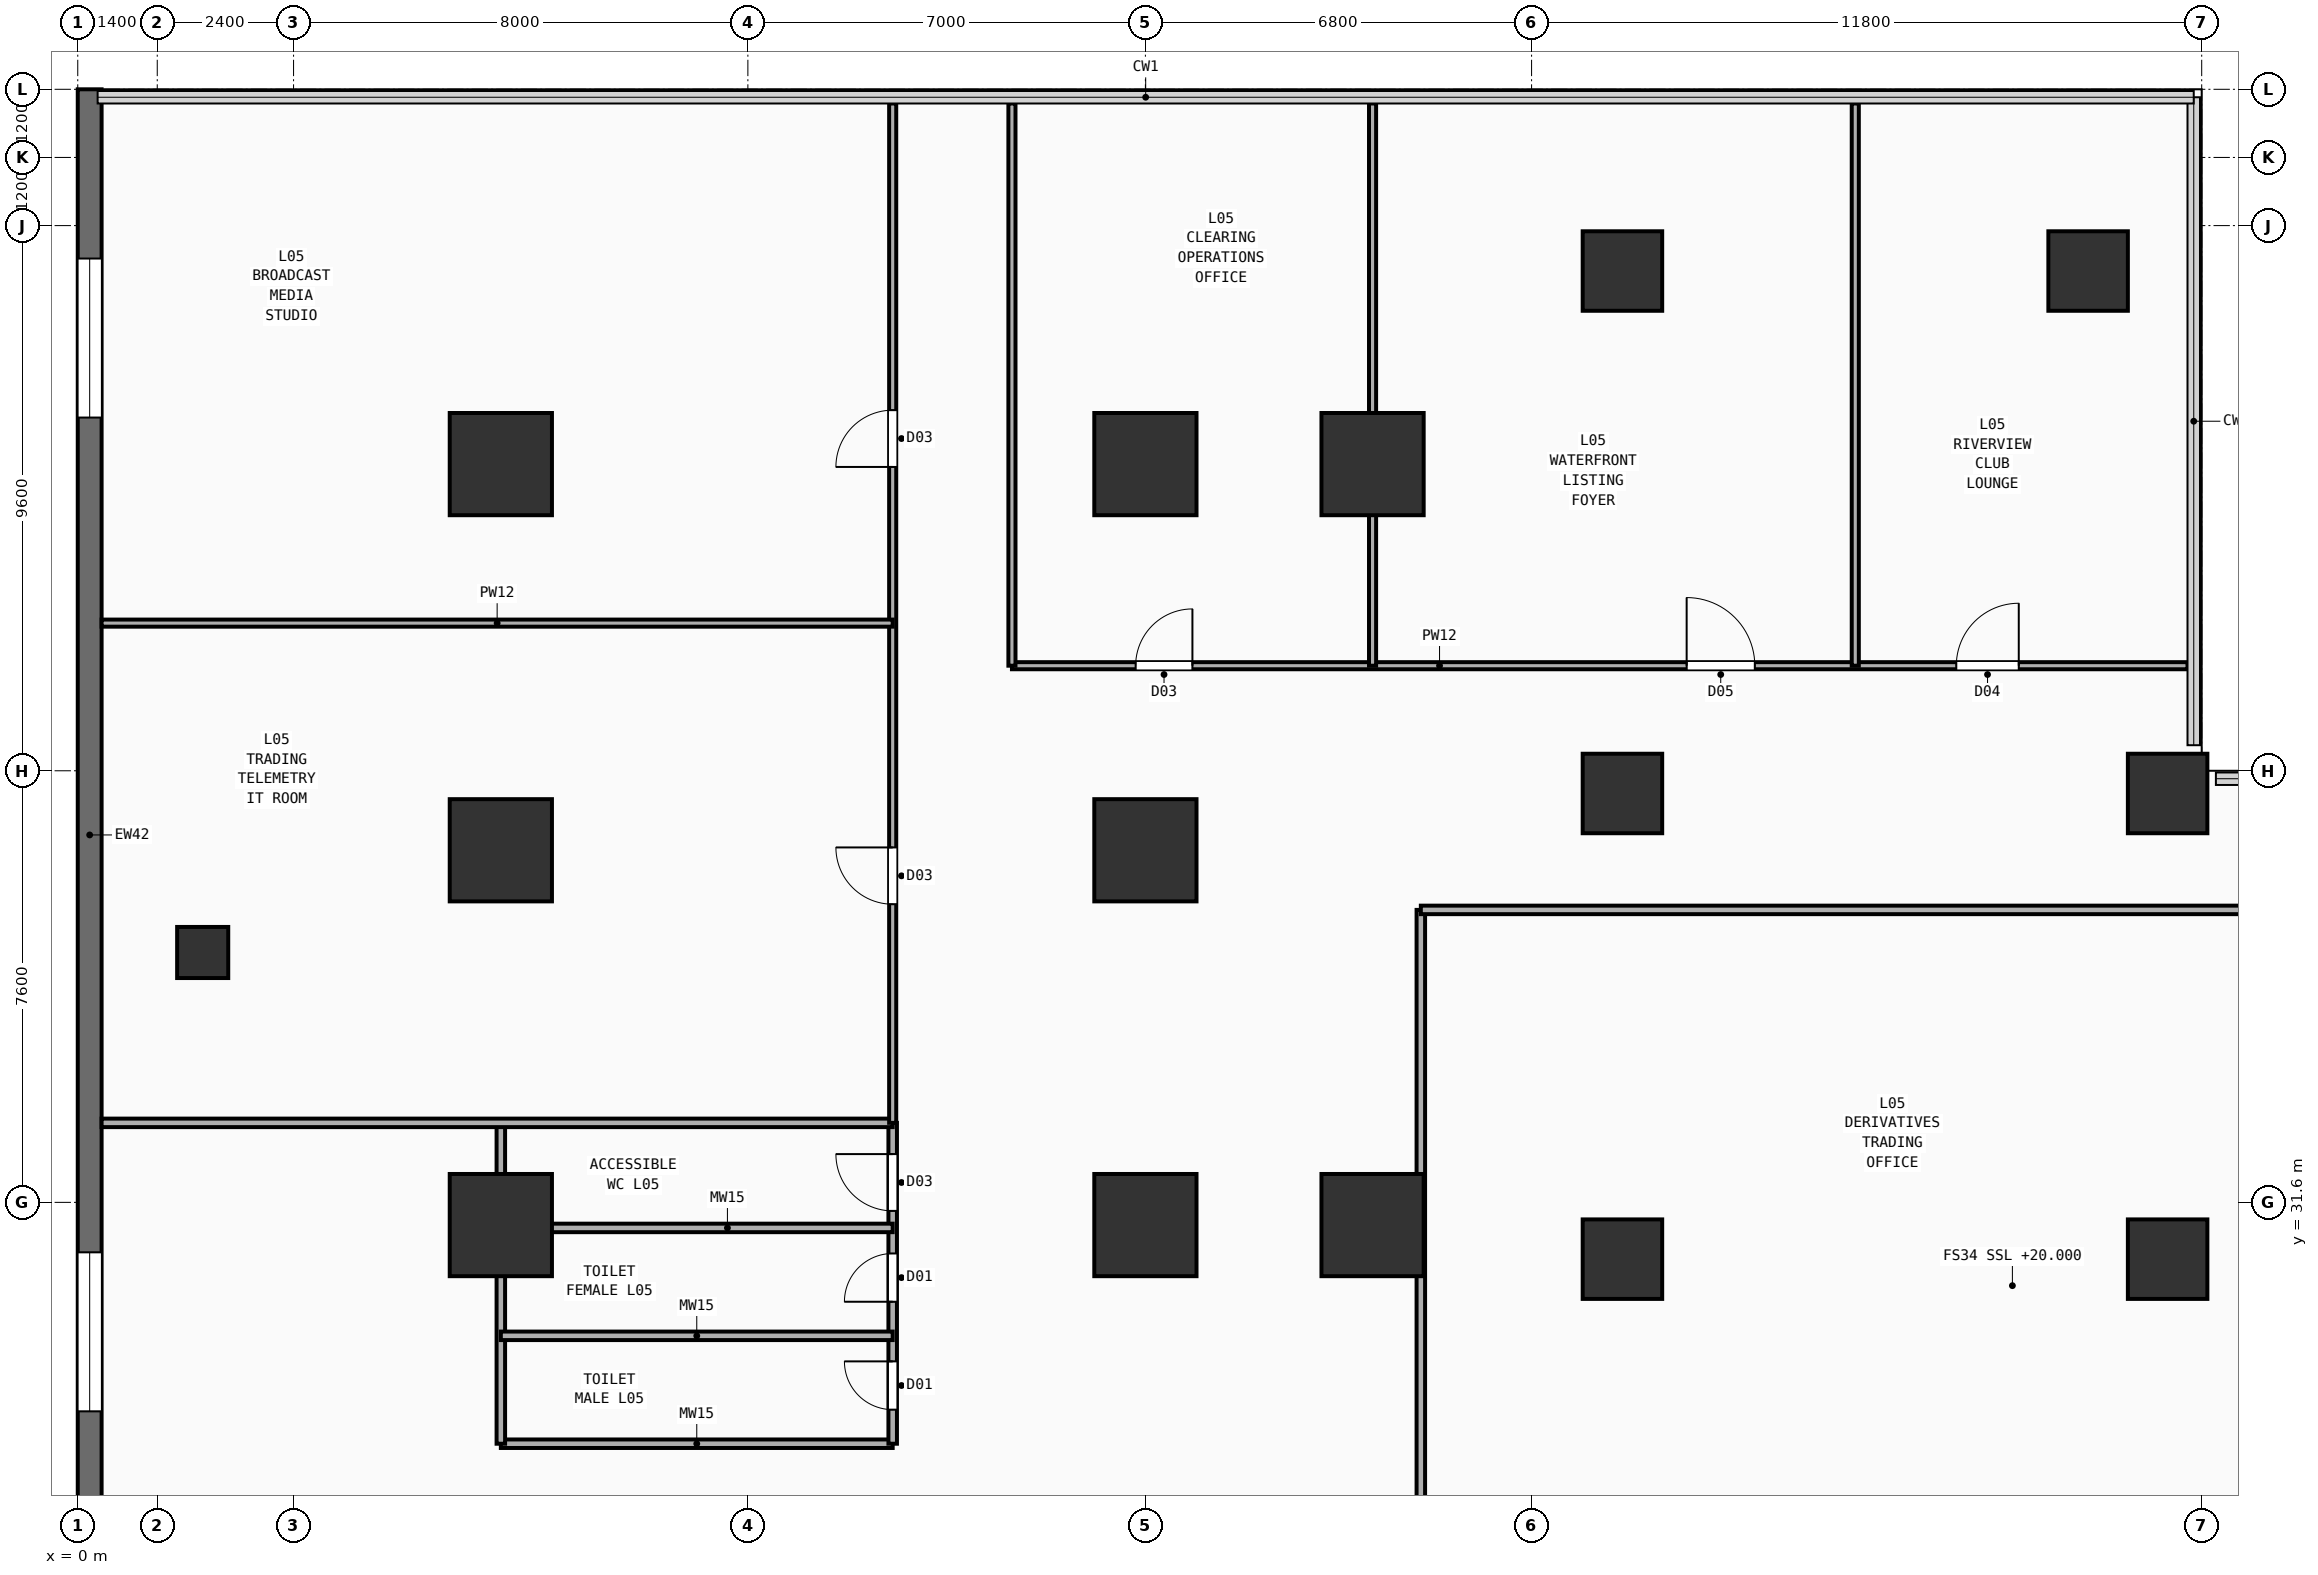
"""IFC4 building model, lengths in metres.
Left out: names, types, materials, properties, quantities, classifications, styles, units other than length and angle.
Written with IfcOpenShell. Run it as: python <this file> out.ifc"""

import sys

from ifc_helpers import new_model, si_unit, direction, frame, frame_2d, origin, origin_2d, place, context, subcontext, project, spatial, rectangle, extrude, element, fill, save


model = new_model("IFC4")
c1 = context("Model", 3, precision=1e-05, world=origin(), true_north=direction((0.0, 1.0)))
c2 = subcontext(c1, "Body", "Model", "MODEL_VIEW")
j1 = project(units=[si_unit("LENGTHUNIT", "METRE"), si_unit("PLANEANGLEUNIT", "RADIAN")], contexts=[c1])
p1 = place(None, origin())
s1 = spatial("IfcSite", under=j1, at=p1, CompositionType="ELEMENT")
p2 = place(p1, origin())
s2 = spatial("IfcBuilding", under=s1, at=p2, CompositionType="ELEMENT")
p3 = place(p2, frame((0.0, 0.0, 20.0)))
s3 = spatial("IfcBuildingStorey", under=s2, at=p3, CompositionType="ELEMENT", Elevation=20.0)
for number, where, z_axis, x_axis in (
    (1, (7.45, 31.2, 0.0), (0.0, 0.0, 1.0), (1.0, 0.0, 0.0)),
    (2, (7.45, 37.8, 0.0), (0.0, 0.0, 1.0), (1.0, 0.0, 0.0)),
    (3, (7.45, 44.6, 0.0), (0.0, 0.0, 1.0), (1.0, 0.0, 0.0)),
    (4, (18.8, 31.2, 0.0), (0.0, 0.0, 1.0), (1.0, 0.0, 0.0)),
    (5, (18.8, 37.8, 0.0), (0.0, 0.0, 1.0), (1.0, 0.0, 0.0)),
    (6, (18.8, 44.6, 0.0), (0.0, 0.0, 1.0), (1.0, 0.0, 0.0)),
    (7, (22.8, 31.2, 0.0), (0.0, 0.0, 1.0), (1.0, 0.0, 0.0)),
    (8, (22.8, 44.6, 0.0), (0.0, 0.0, 1.0), (1.0, 0.0, 0.0)),
):
    element("IfcColumn", number, at=place(p3, frame(where, z_axis=z_axis, x_axis=x_axis)), inside=s3, PredefinedType="COLUMN", context=c2, shape_type="SweptSolid", body=[
        extrude(rectangle(XDim=1.8, YDim=1.8, at=origin_2d()), origin(), (0.0, 0.0, 1.0), 4.46),
    ])
for number, where, z_axis, x_axis in (
    (9, (27.2, 30.6, 0.0), (0.0, 0.0, 1.0), (1.0, 0.0, 0.0)),
    (10, (36.8, 30.6, 0.0), (0.0, 0.0, 1.0), (1.0, 0.0, 0.0)),
    (11, (27.2, 38.8, 0.0), (0.0, 0.0, 1.0), (1.0, 0.0, 0.0)),
    (12, (36.8, 38.8, 0.0), (0.0, 0.0, 1.0), (1.0, 0.0, 0.0)),
    (13, (27.2, 48.0, 0.0), (0.0, 0.0, 1.0), (1.0, 0.0, 0.0)),
    (14, (35.4, 48.0, 0.0), (0.0, 0.0, 1.0), (1.0, 0.0, 0.0)),
):
    element("IfcColumn", number, at=place(p3, frame(where, z_axis=z_axis, x_axis=x_axis)), inside=s3, PredefinedType="COLUMN", context=c2, shape_type="SweptSolid", body=[
        extrude(rectangle(XDim=1.4, YDim=1.4, at=origin_2d()), origin(), (0.0, 0.0, 1.0), 4.46),
    ])
p4 = place(p3, frame((2.2, 36.0, 0.0), z_axis=(0.0, 0.0, 1.0), x_axis=(1.0, 0.0, 0.0)))
e15 = element("IfcColumn", 15, at=p4, inside=s3, PredefinedType="PILASTER", context=c2, shape_type="SweptSolid", body=[
    extrude(rectangle(XDim=0.9, YDim=0.9, at=origin_2d()), origin(), (0.0, 0.0, 1.0), 4.46),
])
p5 = place(p3, frame((0.21, 0.42, 0.0), z_axis=(0.0, 0.0, 1.0), x_axis=(0.0, 1.0, 0.0)))
e16 = element("IfcWall", 16, at=p5, inside=s3, PredefinedType="SOLIDWALL", context=c2, shape_type="SweptSolid", body=[
    extrude(rectangle(XDim=50.78, YDim=0.42, at=frame_2d((25.39, 0.0))), origin(), (0.0, 0.0, 1.0), 4.46),
])
p6 = place(p5, frame((8.0, 0.0, 0.95)))
e17 = element("IfcOpeningElement", 17, at=p6, cuts=e16, PredefinedType="OPENING", context=c2, shape_type="SweptSolid", body=[
    extrude(rectangle(XDim=2.8, YDim=2.4, at=frame_2d((1.4, 1.2))), frame((0.0, 0.22, 0.0), z_axis=(0.0, -1.0, 0.0), x_axis=(1.0, 0.0, 0.0)), (0.0, 0.0, 1.0), 0.44),
])
p7 = place(p5, frame((18.0, 0.0, 0.95)))
e18 = element("IfcOpeningElement", 18, at=p7, cuts=e16, PredefinedType="OPENING", context=c2, shape_type="SweptSolid", body=[
    extrude(rectangle(XDim=2.8, YDim=2.4, at=frame_2d((1.4, 1.2))), frame((0.0, 0.22, 0.0), z_axis=(0.0, -1.0, 0.0), x_axis=(1.0, 0.0, 0.0)), (0.0, 0.0, 1.0), 0.44),
])
p8 = place(p5, frame((27.5, 0.0, 0.95)))
e19 = element("IfcOpeningElement", 19, at=p8, cuts=e16, PredefinedType="OPENING", context=c2, shape_type="SweptSolid", body=[
    extrude(rectangle(XDim=2.8, YDim=2.4, at=frame_2d((1.4, 1.2))), frame((0.0, 0.22, 0.0), z_axis=(0.0, -1.0, 0.0), x_axis=(1.0, 0.0, 0.0)), (0.0, 0.0, 1.0), 0.44),
])
p9 = place(p5, frame((45.0, 0.0, 0.95)))
e20 = element("IfcOpeningElement", 20, at=p9, cuts=e16, PredefinedType="OPENING", context=c2, shape_type="SweptSolid", body=[
    extrude(rectangle(XDim=2.8, YDim=2.4, at=frame_2d((1.4, 1.2))), frame((0.0, 0.22, 0.0), z_axis=(0.0, -1.0, 0.0), x_axis=(1.0, 0.0, 0.0)), (0.0, 0.0, 1.0), 0.44),
])
p10 = place(p3, frame((7.45, 27.35, 0.0), z_axis=(0.0, 0.0, 1.0), x_axis=(1.0, 0.0, 0.0)))
e21 = element("IfcWall", 21, at=p10, inside=s3, PredefinedType="PLUMBINGWALL", context=c2, shape_type="SweptSolid", body=[
    extrude(rectangle(XDim=6.9, YDim=0.15, at=frame_2d((3.45, 0.0))), origin(), (0.0, 0.0, 1.0), 4.46),
])
p11 = place(p3, frame((7.45, 27.35, 0.0), z_axis=(0.0, 0.0, 1.0), x_axis=(0.0, 1.0, 0.0)))
e22 = element("IfcWall", 22, at=p11, inside=s3, PredefinedType="PLUMBINGWALL", context=c2, shape_type="SweptSolid", body=[
    extrude(rectangle(XDim=5.65, YDim=0.15, at=frame_2d((2.825, 0.0))), origin(), (0.0, 0.0, 1.0), 4.1),
])
p12 = place(p3, frame((14.35, 27.35, 0.0), z_axis=(0.0, 0.0, 1.0), x_axis=(0.0, 1.0, 0.0)))
e23 = element("IfcWall", 23, at=p12, inside=s3, PredefinedType="PLUMBINGWALL", context=c2, shape_type="SweptSolid", body=[
    extrude(rectangle(XDim=5.65, YDim=0.15, at=frame_2d((2.825, 0.0))), origin(), (0.0, 0.0, 1.0), 4.46),
])
p13 = place(p12, frame((0.6, 0.0, 0.0)))
e24 = element("IfcOpeningElement", 24, at=p13, cuts=e23, PredefinedType="OPENING", context=c2, shape_type="SweptSolid", body=[
    extrude(rectangle(XDim=0.85, YDim=2.15, at=frame_2d((0.425, 1.075))), frame((0.0, 0.085, 0.0), z_axis=(0.0, -1.0, 0.0), x_axis=(1.0, 0.0, 0.0)), (0.0, 0.0, 1.0), 0.17),
])
p14 = place(p12, frame((2.5, 0.0, 0.0)))
e25 = element("IfcOpeningElement", 25, at=p14, cuts=e23, PredefinedType="OPENING", context=c2, shape_type="SweptSolid", body=[
    extrude(rectangle(XDim=0.85, YDim=2.15, at=frame_2d((0.425, 1.075))), frame((0.0, 0.085, 0.0), z_axis=(0.0, -1.0, 0.0), x_axis=(1.0, 0.0, 0.0)), (0.0, 0.0, 1.0), 0.17),
])
p15 = place(p12, frame((4.1, 0.0, 0.0)))
e26 = element("IfcOpeningElement", 26, at=p15, cuts=e23, PredefinedType="OPENING", context=c2, shape_type="SweptSolid", body=[
    extrude(rectangle(XDim=1.0, YDim=2.2, at=frame_2d((0.5, 1.1))), frame((0.0, 0.085, 0.0), z_axis=(0.0, -1.0, 0.0), x_axis=(1.0, 0.0, 0.0)), (0.0, 0.0, 1.0), 0.17),
])
p16 = place(p3, frame((7.45, 29.25, 0.0), z_axis=(0.0, 0.0, 1.0), x_axis=(1.0, 0.0, 0.0)))
e27 = element("IfcWall", 27, at=p16, inside=s3, PredefinedType="PLUMBINGWALL", context=c2, shape_type="SweptSolid", body=[
    extrude(rectangle(XDim=6.9, YDim=0.15, at=frame_2d((3.45, 0.0))), origin(), (0.0, 0.0, 1.0), 3.96),
])
p17 = place(p3, frame((7.45, 31.15, 0.0), z_axis=(0.0, 0.0, 1.0), x_axis=(1.0, 0.0, 0.0)))
e28 = element("IfcWall", 28, at=p17, inside=s3, PredefinedType="PLUMBINGWALL", context=c2, shape_type="SweptSolid", body=[
    extrude(rectangle(XDim=6.9, YDim=0.15, at=frame_2d((3.45, 0.0))), origin(), (0.0, 0.0, 1.0), 3.86),
])
p18 = place(p3, frame((0.42, 33.0, 0.0), z_axis=(0.0, 0.0, 1.0), x_axis=(1.0, 0.0, 0.0)))
e29 = element("IfcWall", 29, at=p18, inside=s3, PredefinedType="PLUMBINGWALL", context=c2, shape_type="SweptSolid", body=[
    extrude(rectangle(XDim=13.93, YDim=0.15, at=frame_2d((6.965, 0.0))), origin(), (0.0, 0.0, 1.0), 4.46),
])
p19 = place(p3, frame((23.65, 16.35, 0.0), z_axis=(0.0, 0.0, 1.0), x_axis=(0.0, 1.0, 0.0)))
e30 = element("IfcWall", 30, at=p19, inside=s3, PredefinedType="PARTITIONING", context=c2, shape_type="SweptSolid", body=[
    extrude(rectangle(XDim=20.4, YDim=0.15, at=frame_2d((10.2, 0.0))), origin(), (0.0, 0.0, 1.0), 4.46),
])
p20 = place(p3, frame((23.65, 36.75, 0.0), z_axis=(0.0, 0.0, 1.0), x_axis=(1.0, 0.0, 0.0)))
e31 = element("IfcWall", 31, at=p20, inside=s3, PredefinedType="PARTITIONING", context=c2, shape_type="SweptSolid", body=[
    extrude(rectangle(XDim=40.9, YDim=0.15, at=frame_2d((20.45, 0.0))), origin(), (0.0, 0.0, 1.0), 4.46),
])
p21 = place(p3, frame((14.35, 33.0, 0.0), z_axis=(0.0, 0.0, 1.0), x_axis=(0.0, 1.0, 0.0)))
e32 = element("IfcWall", 32, at=p21, inside=s3, PredefinedType="PARTITIONING", context=c2, shape_type="SweptSolid", body=[
    extrude(rectangle(XDim=17.95, YDim=0.125, at=frame_2d((8.975, 0.0))), origin(), (0.0, 0.0, 1.0), 4.46),
])
p22 = place(p21, frame((3.85, 0.0, 0.0)))
e33 = element("IfcOpeningElement", 33, at=p22, cuts=e32, PredefinedType="OPENING", context=c2, shape_type="SweptSolid", body=[
    extrude(rectangle(XDim=1.0, YDim=2.2, at=frame_2d((0.5, 1.1))), frame((0.0, 0.073, 0.0), z_axis=(0.0, -1.0, 0.0), x_axis=(1.0, 0.0, 0.0)), (0.0, 0.0, 1.0), 0.145),
])
p23 = place(p21, frame((11.55, 0.0, 0.0)))
e34 = element("IfcOpeningElement", 34, at=p23, cuts=e32, PredefinedType="OPENING", context=c2, shape_type="SweptSolid", body=[
    extrude(rectangle(XDim=1.0, YDim=2.2, at=frame_2d((0.5, 1.1))), frame((0.0, 0.073, 0.0), z_axis=(0.0, -1.0, 0.0), x_axis=(1.0, 0.0, 0.0)), (0.0, 0.0, 1.0), 0.145),
])
p24 = place(p3, frame((0.42, 41.8, 0.0), z_axis=(0.0, 0.0, 1.0), x_axis=(1.0, 0.0, 0.0)))
e35 = element("IfcWall", 35, at=p24, inside=s3, PredefinedType="PARTITIONING", context=c2, shape_type="SweptSolid", body=[
    extrude(rectangle(XDim=13.93, YDim=0.125, at=frame_2d((6.965, 0.0))), origin(), (0.0, 0.0, 1.0), 4.46),
])
p25 = place(p3, frame((16.45, 41.05, 0.0), z_axis=(0.0, 0.0, 1.0), x_axis=(1.0, 0.0, 0.0)))
e36 = element("IfcWall", 36, at=p25, inside=s3, PredefinedType="PARTITIONING", context=c2, shape_type="SweptSolid", body=[
    extrude(rectangle(XDim=20.7, YDim=0.125, at=frame_2d((10.35, 0.0))), origin(), (0.0, 0.0, 1.0), 4.46),
])
p26 = place(p25, frame((2.178, 0.0, 0.0)))
e37 = element("IfcOpeningElement", 37, at=p26, cuts=e36, PredefinedType="OPENING", context=c2, shape_type="SweptSolid", body=[
    extrude(rectangle(XDim=1.0, YDim=2.2, at=frame_2d((0.5, 1.1))), frame((0.0, 0.073, 0.0), z_axis=(0.0, -1.0, 0.0), x_axis=(1.0, 0.0, 0.0)), (0.0, 0.0, 1.0), 0.145),
])
p27 = place(p25, frame((11.881, 0.0, 0.0)))
e38 = element("IfcOpeningElement", 38, at=p27, cuts=e36, PredefinedType="OPENING", context=c2, shape_type="SweptSolid", body=[
    extrude(rectangle(XDim=1.2, YDim=2.25, at=frame_2d((0.6, 1.125))), frame((0.0, 0.073, 0.0), z_axis=(0.0, -1.0, 0.0), x_axis=(1.0, 0.0, 0.0)), (0.0, 0.0, 1.0), 0.145),
])
p28 = place(p25, frame((16.629, 0.0, 0.0)))
e39 = element("IfcOpeningElement", 39, at=p28, cuts=e36, PredefinedType="OPENING", context=c2, shape_type="SweptSolid", body=[
    extrude(rectangle(XDim=1.1, YDim=2.2, at=frame_2d((0.55, 1.1))), frame((0.0, 0.073, 0.0), z_axis=(0.0, -1.0, 0.0), x_axis=(1.0, 0.0, 0.0)), (0.0, 0.0, 1.0), 0.145),
])
for number, where, z_axis, x_axis in (
    (40, (16.45, 41.05, 0.0), (0.0, 0.0, 1.0), (0.0, 1.0, 0.0)),
    (41, (22.8, 41.05, 0.0), (0.0, 0.0, 1.0), (0.0, 1.0, 0.0)),
    (42, (31.3, 41.05, 0.0), (0.0, 0.0, 1.0), (0.0, 1.0, 0.0)),
):
    element("IfcWall", number, at=place(p3, frame(where, z_axis=z_axis, x_axis=x_axis)), inside=s3, PredefinedType="PARTITIONING", context=c2, shape_type="SweptSolid", body=[
        extrude(rectangle(XDim=9.9, YDim=0.125, at=frame_2d((4.95, 0.0))), origin(), (0.0, 0.0, 1.0), 4.46),
    ])
p29 = place(p8, origin())
e43 = element("IfcWindow", 43, at=p29, inside=s3, PartitioningType="SINGLE_PANEL", PredefinedType="WINDOW", context=c2, shape_type="SweptSolid", body=[
    extrude(rectangle(XDim=2.8, YDim=2.4, at=frame_2d((1.4, 1.2))), frame((0.0, 0.03, 0.0), z_axis=(0.0, -1.0, 0.0), x_axis=(1.0, 0.0, 0.0)), (0.0, 0.0, 1.0), 0.06),
])
fill(e19, e43)
p30 = place(p9, origin())
e44 = element("IfcWindow", 44, at=p30, inside=s3, PartitioningType="SINGLE_PANEL", PredefinedType="WINDOW", context=c2, shape_type="SweptSolid", body=[
    extrude(rectangle(XDim=2.8, YDim=2.4, at=frame_2d((1.4, 1.2))), frame((0.0, 0.03, 0.0), z_axis=(0.0, -1.0, 0.0), x_axis=(1.0, 0.0, 0.0)), (0.0, 0.0, 1.0), 0.06),
])
fill(e20, e44)
p31 = place(p13, origin())
e45 = element("IfcDoor", 45, at=p31, inside=s3, OperationType="SINGLE_SWING_RIGHT", PredefinedType="DOOR", context=c2, shape_type="SweptSolid", body=[
    extrude(rectangle(XDim=0.85, YDim=2.15, at=frame_2d((0.425, 1.075))), frame((0.0, 0.025, 0.0), z_axis=(0.0, -1.0, 0.0), x_axis=(1.0, 0.0, 0.0)), (0.0, 0.0, 1.0), 0.05),
])
fill(e24, e45)
p32 = place(p14, origin())
e46 = element("IfcDoor", 46, at=p32, inside=s3, OperationType="SINGLE_SWING_LEFT", PredefinedType="DOOR", context=c2, shape_type="SweptSolid", body=[
    extrude(rectangle(XDim=0.85, YDim=2.15, at=frame_2d((0.425, 1.075))), frame((0.0, 0.025, 0.0), z_axis=(0.0, -1.0, 0.0), x_axis=(1.0, 0.0, 0.0)), (0.0, 0.0, 1.0), 0.05),
])
fill(e25, e46)
p33 = place(p15, origin())
e47 = element("IfcDoor", 47, at=p33, inside=s3, OperationType="SINGLE_SWING_RIGHT", PredefinedType="DOOR", context=c2, shape_type="SweptSolid", body=[
    extrude(rectangle(XDim=1.0, YDim=2.2, at=frame_2d((0.5, 1.1))), frame((0.0, 0.025, 0.0), z_axis=(0.0, -1.0, 0.0), x_axis=(1.0, 0.0, 0.0)), (0.0, 0.0, 1.0), 0.05),
])
fill(e26, e47)
p34 = place(p22, origin())
e48 = element("IfcDoor", 48, at=p34, inside=s3, OperationType="SINGLE_SWING_RIGHT", PredefinedType="DOOR", context=c2, shape_type="SweptSolid", body=[
    extrude(rectangle(XDim=1.0, YDim=2.2, at=frame_2d((0.5, 1.1))), frame((0.0, 0.025, 0.0), z_axis=(0.0, -1.0, 0.0), x_axis=(1.0, 0.0, 0.0)), (0.0, 0.0, 1.0), 0.05),
])
fill(e33, e48)
p35 = place(p23, origin())
e49 = element("IfcDoor", 49, at=p35, inside=s3, OperationType="SINGLE_SWING_LEFT", PredefinedType="DOOR", context=c2, shape_type="SweptSolid", body=[
    extrude(rectangle(XDim=1.0, YDim=2.2, at=frame_2d((0.5, 1.1))), frame((0.0, 0.025, 0.0), z_axis=(0.0, -1.0, 0.0), x_axis=(1.0, 0.0, 0.0)), (0.0, 0.0, 1.0), 0.05),
])
fill(e34, e49)
p36 = place(p26, origin())
e50 = element("IfcDoor", 50, at=p36, inside=s3, OperationType="SINGLE_SWING_RIGHT", PredefinedType="DOOR", context=c2, shape_type="SweptSolid", body=[
    extrude(rectangle(XDim=1.0, YDim=2.2, at=frame_2d((0.5, 1.1))), frame((0.0, 0.025, 0.0), z_axis=(0.0, -1.0, 0.0), x_axis=(1.0, 0.0, 0.0)), (0.0, 0.0, 1.0), 0.05),
])
fill(e37, e50)
p37 = place(p27, origin())
e51 = element("IfcDoor", 51, at=p37, inside=s3, OperationType="SINGLE_SWING_LEFT", PredefinedType="DOOR", context=c2, shape_type="SweptSolid", body=[
    extrude(rectangle(XDim=1.2, YDim=2.25, at=frame_2d((0.6, 1.125))), frame((0.0, 0.025, 0.0), z_axis=(0.0, -1.0, 0.0), x_axis=(1.0, 0.0, 0.0)), (0.0, 0.0, 1.0), 0.05),
])
fill(e38, e51)
p38 = place(p28, origin())
e52 = element("IfcDoor", 52, at=p38, inside=s3, OperationType="SINGLE_SWING_RIGHT", PredefinedType="DOOR", context=c2, shape_type="SweptSolid", body=[
    extrude(rectangle(XDim=1.1, YDim=2.2, at=frame_2d((0.55, 1.1))), frame((0.0, 0.025, 0.0), z_axis=(0.0, -1.0, 0.0), x_axis=(1.0, 0.0, 0.0)), (0.0, 0.0, 1.0), 0.05),
])
fill(e39, e52)
save(model, sys.argv[1])
